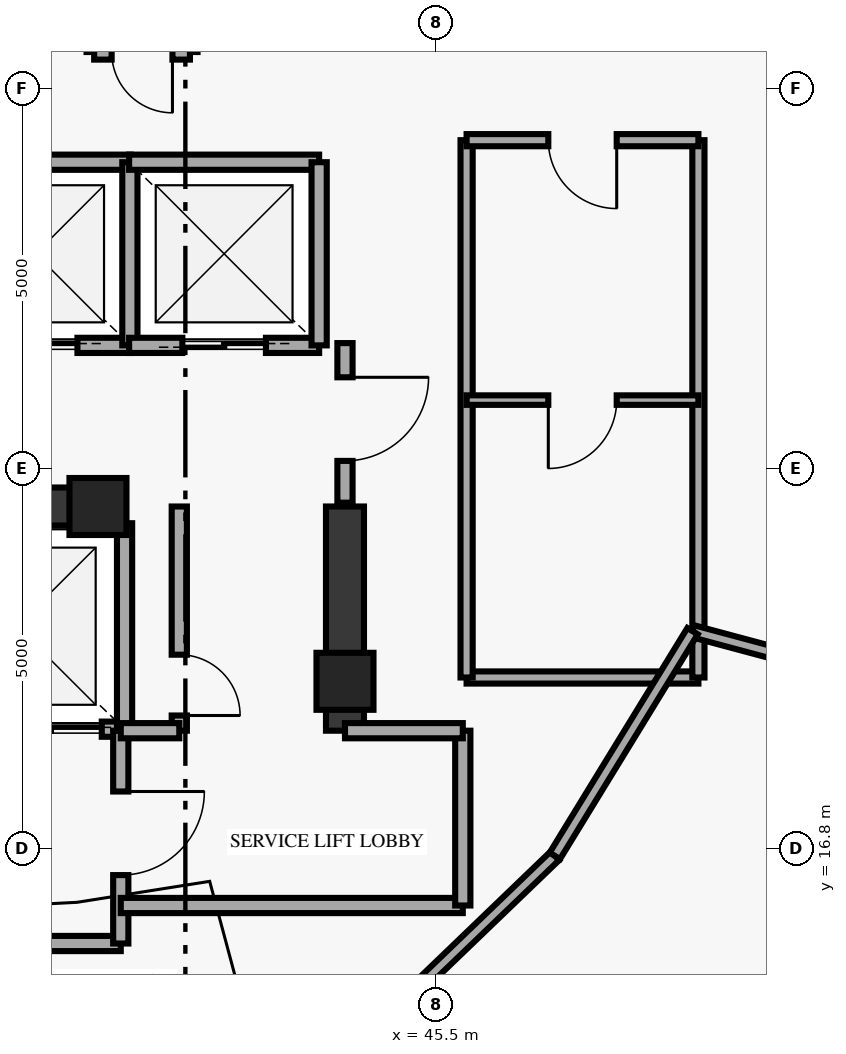
"""IFC4 building model, lengths in metres.
Left out: names, types, materials, properties, quantities, classifications, styles, units other than length and angle.
Written with IfcOpenShell. Run it as: python <this file> out.ifc"""

import sys

from ifc_helpers import new_model, si_unit, direction, frame, frame_2d, origin, origin_2d, place, context, subcontext, project, spatial, rectangle, extrude, element, fill, save


model = new_model("IFC4")
c1 = context("Model", 3, precision=1e-05, world=origin(), true_north=direction((0.0, 1.0)))
c2 = subcontext(c1, "Body", "Model", "MODEL_VIEW")
j1 = project(units=[si_unit("LENGTHUNIT", "METRE"), si_unit("PLANEANGLEUNIT", "RADIAN")], contexts=[c1])
p1 = place(None, origin())
s1 = spatial("IfcSite", under=j1, at=p1, CompositionType="ELEMENT")
p2 = place(p1, origin())
s2 = spatial("IfcBuilding", under=s1, at=p2, CompositionType="ELEMENT")
p3 = place(p2, frame((0.0, 0.0, 306.8)))
s3 = spatial("IfcBuildingStorey", under=s2, at=p3, CompositionType="ELEMENT", Elevation=306.8)
for number, where, z_axis, x_axis in (
    (1, (41.05, 21.3, 0.0), (0.0, 0.0, 1.0), (1.0, 0.0, 0.0)),
    (2, (44.3, 19.0, 0.0), (0.0, 0.0, 1.0), (1.0, 0.0, 0.0)),
):
    element("IfcColumn", number, at=place(p3, frame(where, z_axis=z_axis, x_axis=x_axis)), inside=s3, PredefinedType="PILASTER", context=c2, shape_type="SweptSolid", body=[
        extrude(rectangle(XDim=0.75, YDim=0.75, at=origin_2d()), origin(), (0.0, 0.0, 1.0), 6.18),
    ])
p4 = place(p3, frame((44.3, 18.35, 0.0), z_axis=(0.0, 0.0, 1.0), x_axis=(0.0, 1.0, 0.0)))
e3 = element("IfcWall", 3, at=p4, inside=s3, PredefinedType="SHEAR", context=c2, shape_type="SweptSolid", body=[
    extrude(rectangle(XDim=2.95, YDim=0.5, at=frame_2d((1.475, 0.0))), origin(), (0.0, 0.0, 1.0), 6.18),
])
p5 = place(p3, frame((33.7, 21.3, 0.0), z_axis=(0.0, 0.0, 1.0), x_axis=(1.0, 0.0, 0.0)))
e4 = element("IfcWall", 4, at=p5, inside=s3, PredefinedType="SHEAR", context=c2, shape_type="SweptSolid", body=[
    extrude(rectangle(XDim=7.55, YDim=0.5, at=frame_2d((3.775, 0.0))), origin(), (0.0, 0.0, 1.0), 6.18),
])
p6 = place(p3, frame((41.0, 27.28, 0.0), z_axis=(0.0, 0.0, 1.0), x_axis=(1.0, 0.0, 0.0)))
e5 = element("IfcWall", 5, at=p6, inside=s3, PredefinedType="SOLIDWALL", context=c2, shape_type="SweptSolid", body=[
    extrude(rectangle(XDim=1.26, YDim=0.2, at=frame_2d((0.63, 0.0))), origin(), (0.0, 0.0, 1.0), 6.18),
])
p7 = place(p6, frame((0.23, 0.0, 0.0)))
e6 = element("IfcOpeningElement", 6, at=p7, cuts=e5, PredefinedType="OPENING", context=c2, shape_type="SweptSolid", body=[
    extrude(rectangle(XDim=0.8, YDim=2.05, at=frame_2d((0.4, 1.025))), frame((0.0, 0.11, 0.0), z_axis=(0.0, -1.0, 0.0), x_axis=(1.0, 0.0, 0.0)), (0.0, 0.0, 1.0), 0.22),
])
p8 = place(p3, frame((38.98, 23.42, 0.0), z_axis=(0.0, 0.0, 1.0), x_axis=(1.0, 0.0, 0.0)))
e7 = element("IfcWall", 7, at=p8, inside=s3, PredefinedType="SOLIDWALL", context=c2, shape_type="SweptSolid", body=[
    extrude(rectangle(XDim=2.5, YDim=0.2, at=frame_2d((1.25, 0.0))), origin(), (0.0, 0.0, 1.0), 6.18),
])
p9 = place(p8, frame((0.7, 0.0, 0.0)))
e8 = element("IfcOpeningElement", 8, at=p9, cuts=e7, PredefinedType="OPENING", context=c2, shape_type="SweptSolid", body=[
    extrude(rectangle(XDim=1.1, YDim=2.15, at=frame_2d((0.55, 1.075))), frame((0.0, 0.11, 0.0), z_axis=(0.0, -1.0, 0.0), x_axis=(1.0, 0.0, 0.0)), (0.0, 0.0, 1.0), 0.22),
])
p10 = place(p3, frame((38.98, 25.83, 0.0), z_axis=(0.0, 0.0, 1.0), x_axis=(1.0, 0.0, 0.0)))
e9 = element("IfcWall", 9, at=p10, inside=s3, PredefinedType="SOLIDWALL", context=c2, shape_type="SweptSolid", body=[
    extrude(rectangle(XDim=2.5, YDim=0.2, at=frame_2d((1.25, 0.0))), origin(), (0.0, 0.0, 1.0), 6.18),
])
p11 = place(p3, frame((41.47, 23.42, 0.0), z_axis=(0.0, 0.0, 1.0), x_axis=(0.0, 1.0, 0.0)))
e10 = element("IfcWall", 10, at=p11, inside=s3, PredefinedType="SOLIDWALL", context=c2, shape_type="SweptSolid", body=[
    extrude(rectangle(XDim=2.41, YDim=0.2, at=frame_2d((1.205, 0.0))), origin(), (0.0, 0.0, 1.0), 6.18),
])
p12 = place(p3, frame((41.46, 23.42, 0.0), z_axis=(0.0, 0.0, 1.0), x_axis=(1.0, 0.0, 0.0)))
e11 = element("IfcWall", 11, at=p12, inside=s3, PredefinedType="SOLIDWALL", context=c2, shape_type="SweptSolid", body=[
    extrude(rectangle(XDim=2.5, YDim=0.2, at=frame_2d((1.25, 0.0))), origin(), (0.0, 0.0, 1.0), 6.18),
])
p13 = place(p12, frame((0.7, 0.0, 0.0)))
e12 = element("IfcOpeningElement", 12, at=p13, cuts=e11, PredefinedType="OPENING", context=c2, shape_type="SweptSolid", body=[
    extrude(rectangle(XDim=1.1, YDim=2.15, at=frame_2d((0.55, 1.075))), frame((0.0, 0.11, 0.0), z_axis=(0.0, -1.0, 0.0), x_axis=(1.0, 0.0, 0.0)), (0.0, 0.0, 1.0), 0.22),
])
p14 = place(p3, frame((41.46, 25.83, 0.0), z_axis=(0.0, 0.0, 1.0), x_axis=(1.0, 0.0, 0.0)))
e13 = element("IfcWall", 13, at=p14, inside=s3, PredefinedType="SOLIDWALL", context=c2, shape_type="SweptSolid", body=[
    extrude(rectangle(XDim=2.5, YDim=0.2, at=frame_2d((1.25, 0.0))), origin(), (0.0, 0.0, 1.0), 6.18),
])
p15 = place(p3, frame((43.96, 23.42, 0.0), z_axis=(0.0, 0.0, 1.0), x_axis=(0.0, 1.0, 0.0)))
e14 = element("IfcWall", 14, at=p15, inside=s3, PredefinedType="SOLIDWALL", context=c2, shape_type="SweptSolid", body=[
    extrude(rectangle(XDim=2.41, YDim=0.2, at=frame_2d((1.205, 0.0))), origin(), (0.0, 0.0, 1.0), 6.18),
])
p16 = place(p3, frame((38.57, 18.37, 0.0), z_axis=(0.0, 0.0, 1.0), x_axis=(1.0, 0.0, 0.0)))
e15 = element("IfcWall", 15, at=p16, inside=s3, PredefinedType="SOLIDWALL", context=c2, shape_type="SweptSolid", body=[
    extrude(rectangle(XDim=2.83, YDim=0.2, at=frame_2d((1.415, 0.0))), origin(), (0.0, 0.0, 1.0), 6.18),
])
p17 = place(p16, frame((1.18, 0.0, 0.0)))
e16 = element("IfcOpeningElement", 16, at=p17, cuts=e15, PredefinedType="OPENING", context=c2, shape_type="SweptSolid", body=[
    extrude(rectangle(XDim=1.35, YDim=2.18, at=frame_2d((0.675, 1.09))), frame((0.0, 0.11, 0.0), z_axis=(0.0, -1.0, 0.0), x_axis=(1.0, 0.0, 0.0)), (0.0, 0.0, 1.0), 0.22),
])
p18 = place(p3, frame((41.4, 18.37, 0.0), z_axis=(0.0, 0.0, 1.0), x_axis=(0.0, 1.0, 0.0)))
e17 = element("IfcWall", 17, at=p18, inside=s3, PredefinedType="SOLIDWALL", context=c2, shape_type="SweptSolid", body=[
    extrude(rectangle(XDim=2.71, YDim=0.2, at=frame_2d((1.355, 0.0))), origin(), (0.0, 0.0, 1.0), 6.18),
])
p19 = place(p3, frame((45.9, 19.05, 0.0), z_axis=(0.0, 0.0, 1.0), x_axis=(1.0, 0.0, 0.0)))
e18 = element("IfcWall", 18, at=p19, inside=s3, PredefinedType="PARTITIONING", context=c2, shape_type="SweptSolid", body=[
    extrude(rectangle(XDim=3.05, YDim=0.16, at=frame_2d((1.525, 0.0))), origin(), (0.0, 0.0, 1.0), 6.18),
])
for number, where, z_axis, x_axis in (
    (19, (48.95, 19.05, 0.0), (0.0, 0.0, 1.0), (0.0, 1.0, 0.0)),
    (20, (45.9, 19.05, 0.0), (0.0, 0.0, 1.0), (0.0, 1.0, 0.0)),
):
    element("IfcWall", number, at=place(p3, frame(where, z_axis=z_axis, x_axis=x_axis)), inside=s3, PredefinedType="PARTITIONING", context=c2, shape_type="SweptSolid", body=[
        extrude(rectangle(XDim=7.07, YDim=0.16, at=frame_2d((3.535, 0.0))), origin(), (0.0, 0.0, 1.0), 6.18),
    ])
p20 = place(p3, frame((48.95, 22.7, 0.0), z_axis=(0.0, 0.0, 1.0), x_axis=(-1.0, 0.0, 0.0)))
e21 = element("IfcWall", 21, at=p20, inside=s3, PredefinedType="PARTITIONING", context=c2, shape_type="SweptSolid", body=[
    extrude(rectangle(XDim=3.05, YDim=0.125, at=frame_2d((1.525, 0.0))), origin(), (0.0, 0.0, 1.0), 6.18),
])
p21 = place(p20, frame((1.075, 0.0, 0.0)))
e22 = element("IfcOpeningElement", 22, at=p21, cuts=e21, PredefinedType="OPENING", context=c2, shape_type="SweptSolid", body=[
    extrude(rectangle(XDim=0.9, YDim=2.1, at=frame_2d((0.45, 1.05))), frame((0.0, 0.073, 0.0), z_axis=(0.0, -1.0, 0.0), x_axis=(1.0, 0.0, 0.0)), (0.0, 0.0, 1.0), 0.145),
])
p22 = place(p3, frame((48.95, 26.12, 0.0), z_axis=(0.0, 0.0, 1.0), x_axis=(-1.0, 0.0, 0.0)))
e23 = element("IfcWall", 23, at=p22, inside=s3, PredefinedType="PARTITIONING", context=c2, shape_type="SweptSolid", body=[
    extrude(rectangle(XDim=3.05, YDim=0.16, at=frame_2d((1.525, 0.0))), origin(), (0.0, 0.0, 1.0), 6.18),
])
p23 = place(p22, frame((1.075, 0.0, 0.0)))
e24 = element("IfcOpeningElement", 24, at=p23, cuts=e23, PredefinedType="OPENING", context=c2, shape_type="SweptSolid", body=[
    extrude(rectangle(XDim=0.9, YDim=2.1, at=frame_2d((0.45, 1.05))), frame((0.0, 0.09, 0.0), z_axis=(0.0, -1.0, 0.0), x_axis=(1.0, 0.0, 0.0)), (0.0, 0.0, 1.0), 0.18),
])
p24 = place(p3, frame((44.3, 21.35, 0.0), z_axis=(0.0, 0.0, 1.0), x_axis=(0.0, 1.0, 0.0)))
e25 = element("IfcWall", 25, at=p24, inside=s3, PredefinedType="SOLIDWALL", context=c2, shape_type="SweptSolid", body=[
    extrude(rectangle(XDim=2.1, YDim=0.2, at=frame_2d((1.05, 0.0))), origin(), (0.0, 0.0, 1.0), 6.18),
])
p25 = place(p24, frame((0.55, 0.0, 0.0)))
e26 = element("IfcOpeningElement", 26, at=p25, cuts=e25, PredefinedType="OPENING", context=c2, shape_type="SweptSolid", body=[
    extrude(rectangle(XDim=1.1, YDim=2.15, at=frame_2d((0.55, 1.075))), frame((0.0, 0.11, 0.0), z_axis=(0.0, -1.0, 0.0), x_axis=(1.0, 0.0, 0.0)), (0.0, 0.0, 1.0), 0.22),
])
p26 = place(p3, frame((33.8, 15.55, 0.0), z_axis=(0.0, 0.0, 1.0), x_axis=(1.0, 0.0, 0.0)))
e27 = element("IfcWall", 27, at=p26, inside=s3, PredefinedType="SOLIDWALL", context=c2, shape_type="SweptSolid", body=[
    extrude(rectangle(XDim=7.55, YDim=0.2, at=frame_2d((3.775, 0.0))), origin(), (0.0, 0.0, 1.0), 6.18),
])
p27 = place(p3, frame((41.35, 15.55, 0.0), z_axis=(0.0, 0.0, 1.0), x_axis=(0.0, 1.0, 0.0)))
e28 = element("IfcWall", 28, at=p27, inside=s3, PredefinedType="SOLIDWALL", context=c2, shape_type="SweptSolid", body=[
    extrude(rectangle(XDim=2.8, YDim=0.2, at=frame_2d((1.4, 0.0))), origin(), (0.0, 0.0, 1.0), 6.18),
])
p28 = place(p27, frame((0.9, 0.0, 0.0)))
e29 = element("IfcOpeningElement", 29, at=p28, cuts=e28, PredefinedType="OPENING", context=c2, shape_type="SweptSolid", body=[
    extrude(rectangle(XDim=1.1, YDim=2.15, at=frame_2d((0.55, 1.075))), frame((0.0, 0.11, 0.0), z_axis=(0.0, -1.0, 0.0), x_axis=(1.0, 0.0, 0.0)), (0.0, 0.0, 1.0), 0.22),
])
p29 = place(p3, frame((41.35, 16.05, 0.0), z_axis=(0.0, 0.0, 1.0), x_axis=(1.0, 0.0, 0.0)))
e30 = element("IfcWall", 30, at=p29, inside=s3, PredefinedType="SOLIDWALL", context=c2, shape_type="SweptSolid", body=[
    extrude(rectangle(XDim=4.5, YDim=0.2, at=frame_2d((2.25, 0.0))), origin(), (0.0, 0.0, 1.0), 6.18),
])
p30 = place(p3, frame((45.85, 16.05, 0.0), z_axis=(0.0, 0.0, 1.0), x_axis=(0.0, 1.0, 0.0)))
e31 = element("IfcWall", 31, at=p30, inside=s3, PredefinedType="SOLIDWALL", context=c2, shape_type="SweptSolid", body=[
    extrude(rectangle(XDim=2.3, YDim=0.2, at=frame_2d((1.15, 0.0))), origin(), (0.0, 0.0, 1.0), 6.18),
])
p31 = place(p3, frame((44.3, 18.35, 0.0), z_axis=(0.0, 0.0, 1.0), x_axis=(1.0, 0.0, 0.0)))
e32 = element("IfcWall", 32, at=p31, inside=s3, PredefinedType="SOLIDWALL", context=c2, shape_type="SweptSolid", body=[
    extrude(rectangle(XDim=1.55, YDim=0.2, at=frame_2d((0.775, 0.0))), origin(), (0.0, 0.0, 1.0), 6.18),
])
p32 = place(p3, frame((42.12, 18.35, 0.0), z_axis=(0.0, 0.0, 1.0), x_axis=(0.0, 1.0, 0.0)))
e33 = element("IfcWall", 33, at=p32, inside=s3, PredefinedType="SOLIDWALL", context=c2, shape_type="SweptSolid", body=[
    extrude(rectangle(XDim=2.95, YDim=0.2, at=frame_2d((1.475, 0.0))), origin(), (0.0, 0.0, 1.0), 6.18),
])
p33 = place(p32, frame((0.2, 0.0, 0.0)))
e34 = element("IfcOpeningElement", 34, at=p33, cuts=e33, PredefinedType="OPENING", context=c2, shape_type="SweptSolid", body=[
    extrude(rectangle(XDim=0.8, YDim=2.05, at=frame_2d((0.4, 1.025))), frame((0.0, 0.11, 0.0), z_axis=(0.0, -1.0, 0.0), x_axis=(1.0, 0.0, 0.0)), (0.0, 0.0, 1.0), 0.22),
])
p34 = place(p3, frame((41.35, 18.35, 0.0), z_axis=(0.0, 0.0, 1.0), x_axis=(1.0, 0.0, 0.0)))
e35 = element("IfcWall", 35, at=p34, inside=s3, PredefinedType="SOLIDWALL", context=c2, shape_type="SweptSolid", body=[
    extrude(rectangle(XDim=0.77, YDim=0.2, at=frame_2d((0.385, 0.0))), origin(), (0.0, 0.0, 1.0), 6.18),
])
p35 = place(p3, frame((48.873, 19.66, 0.0), z_axis=(0.0, 0.0, 1.0), x_axis=(0.965878165217, -0.258996853181, 0.0)))
e36 = element("IfcWall", 36, at=p35, inside=s3, PredefinedType="PARTITIONING", context=c2, shape_type="SweptSolid", body=[
    extrude(rectangle(XDim=1.139, YDim=0.16, at=frame_2d((0.569, 0.0))), origin(), (0.0, 0.0, 1.0), 6.18),
])
p36 = place(p3, frame((44.7, 14.433, 0.0), z_axis=(0.0, 0.0, 1.0), x_axis=(0.72090897908, 0.693029756851, 0.0)))
e37 = element("IfcWall", 37, at=p36, inside=s3, PredefinedType="PARTITIONING", context=c2, shape_type="SweptSolid", body=[
    extrude(rectangle(XDim=3.275, YDim=0.16, at=frame_2d((1.638, 0.0))), origin(), (0.0, 0.0, 1.0), 6.18),
])
p37 = place(p3, frame((47.061, 16.703, 0.0), z_axis=(0.0, 0.0, 1.0), x_axis=(0.522486120877, 0.852647789823, 0.0)))
e38 = element("IfcWall", 38, at=p37, inside=s3, PredefinedType="PARTITIONING", context=c2, shape_type="SweptSolid", body=[
    extrude(rectangle(XDim=3.468, YDim=0.16, at=frame_2d((1.734, 0.0))), origin(), (0.0, 0.0, 1.0), 6.18),
])
p38 = place(p7, origin())
e39 = element("IfcDoor", 39, at=p38, inside=s3, OperationType="SINGLE_SWING_RIGHT", PredefinedType="DOOR", context=c2, shape_type="SweptSolid", body=[
    extrude(rectangle(XDim=0.8, YDim=2.05, at=frame_2d((0.4, 1.025))), frame((0.0, 0.025, 0.0), z_axis=(0.0, -1.0, 0.0), x_axis=(1.0, 0.0, 0.0)), (0.0, 0.0, 1.0), 0.05),
])
fill(e6, e39)
p39 = place(p9, origin())
e40 = element("IfcDoor", 40, at=p39, inside=s3, OperationType="DOUBLE_DOOR_SLIDING", PredefinedType="DOOR", context=c2, shape_type="SweptSolid", body=[
    extrude(rectangle(XDim=1.1, YDim=2.15, at=frame_2d((0.55, 1.075))), frame((0.0, 0.025, 0.0), z_axis=(0.0, -1.0, 0.0), x_axis=(1.0, 0.0, 0.0)), (0.0, 0.0, 1.0), 0.05),
])
fill(e8, e40)
p40 = place(p13, origin())
e41 = element("IfcDoor", 41, at=p40, inside=s3, OperationType="DOUBLE_DOOR_SLIDING", PredefinedType="DOOR", context=c2, shape_type="SweptSolid", body=[
    extrude(rectangle(XDim=1.1, YDim=2.15, at=frame_2d((0.55, 1.075))), frame((0.0, 0.025, 0.0), z_axis=(0.0, -1.0, 0.0), x_axis=(1.0, 0.0, 0.0)), (0.0, 0.0, 1.0), 0.05),
])
fill(e12, e41)
p41 = place(p17, origin())
e42 = element("IfcDoor", 42, at=p41, inside=s3, OperationType="DOUBLE_DOOR_SLIDING", PredefinedType="DOOR", context=c2, shape_type="SweptSolid", body=[
    extrude(rectangle(XDim=1.35, YDim=2.18, at=frame_2d((0.675, 1.09))), frame((0.0, 0.025, 0.0), z_axis=(0.0, -1.0, 0.0), x_axis=(1.0, 0.0, 0.0)), (0.0, 0.0, 1.0), 0.05),
])
fill(e16, e42)
p42 = place(p21, origin())
e43 = element("IfcDoor", 43, at=p42, inside=s3, OperationType="SINGLE_SWING_RIGHT", PredefinedType="DOOR", context=c2, shape_type="SweptSolid", body=[
    extrude(rectangle(XDim=0.9, YDim=2.1, at=frame_2d((0.45, 1.05))), frame((0.0, 0.025, 0.0), z_axis=(0.0, -1.0, 0.0), x_axis=(1.0, 0.0, 0.0)), (0.0, 0.0, 1.0), 0.05),
])
fill(e22, e43)
p43 = place(p23, origin())
e44 = element("IfcDoor", 44, at=p43, inside=s3, OperationType="SINGLE_SWING_LEFT", PredefinedType="DOOR", context=c2, shape_type="SweptSolid", body=[
    extrude(rectangle(XDim=0.9, YDim=2.1, at=frame_2d((0.45, 1.05))), frame((0.0, 0.025, 0.0), z_axis=(0.0, -1.0, 0.0), x_axis=(1.0, 0.0, 0.0)), (0.0, 0.0, 1.0), 0.05),
])
fill(e24, e44)
p44 = place(p25, origin())
e45 = element("IfcDoor", 45, at=p44, inside=s3, OperationType="SINGLE_SWING_RIGHT", PredefinedType="DOOR", context=c2, shape_type="SweptSolid", body=[
    extrude(rectangle(XDim=1.1, YDim=2.15, at=frame_2d((0.55, 1.075))), frame((0.0, 0.025, 0.0), z_axis=(0.0, -1.0, 0.0), x_axis=(1.0, 0.0, 0.0)), (0.0, 0.0, 1.0), 0.05),
])
fill(e26, e45)
p45 = place(p28, origin())
e46 = element("IfcDoor", 46, at=p45, inside=s3, OperationType="SINGLE_SWING_RIGHT", PredefinedType="DOOR", context=c2, shape_type="SweptSolid", body=[
    extrude(rectangle(XDim=1.1, YDim=2.15, at=frame_2d((0.55, 1.075))), frame((0.0, 0.025, 0.0), z_axis=(0.0, -1.0, 0.0), x_axis=(1.0, 0.0, 0.0)), (0.0, 0.0, 1.0), 0.05),
])
fill(e29, e46)
p46 = place(p33, origin())
e47 = element("IfcDoor", 47, at=p46, inside=s3, OperationType="SINGLE_SWING_LEFT", PredefinedType="DOOR", context=c2, shape_type="SweptSolid", body=[
    extrude(rectangle(XDim=0.8, YDim=2.05, at=frame_2d((0.4, 1.025))), frame((0.0, 0.025, 0.0), z_axis=(0.0, -1.0, 0.0), x_axis=(1.0, 0.0, 0.0)), (0.0, 0.0, 1.0), 0.05),
])
fill(e34, e47)
save(model, sys.argv[1])
